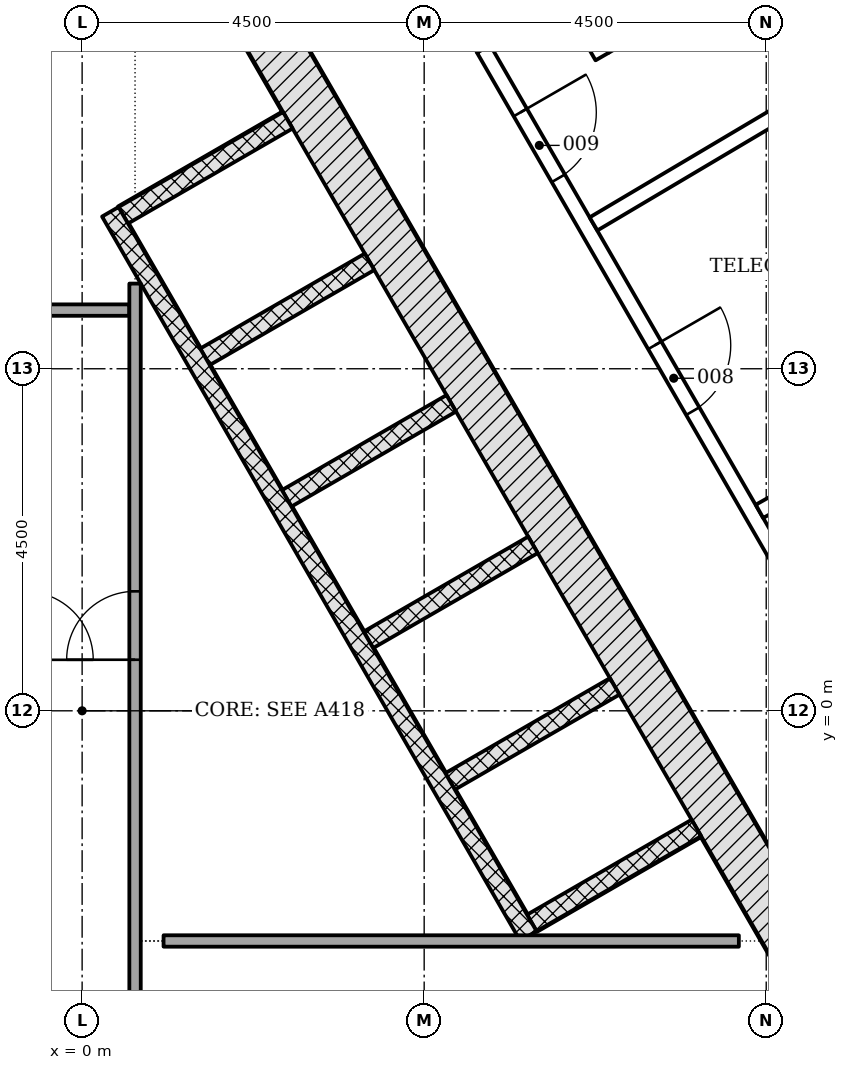
"""IFC4 building model, lengths in metres.
Left out: names, types, materials, properties, quantities, classifications, styles, units other than length and angle.
Written with IfcOpenShell. Run it as: python <this file> out.ifc"""

import sys

from ifc_helpers import new_model, si_unit, direction, frame, frame_2d, origin, place, context, subcontext, project, spatial, rectangle, extrude, element, fill, save


model = new_model("IFC4")
c1 = context("Model", 3, precision=1e-05, world=origin(), true_north=direction((0.0, 1.0)))
c2 = subcontext(c1, "Body", "Model", "MODEL_VIEW")
j1 = project(units=[si_unit("LENGTHUNIT", "METRE"), si_unit("PLANEANGLEUNIT", "RADIAN")], contexts=[c1])
p1 = place(None, origin())
s1 = spatial("IfcSite", under=j1, at=p1, CompositionType="ELEMENT")
p2 = place(p1, origin())
s2 = spatial("IfcBuilding", under=s1, at=p2, CompositionType="ELEMENT")
p3 = place(p2, frame((0.0, 0.0, 258.0)))
s3 = spatial("IfcBuildingStorey", under=s2, at=p3, CompositionType="ELEMENT", Elevation=258.0)
p4 = place(p3, frame((10.311, -4.703, -0.3), z_axis=(0.0, 0.0, 1.0), x_axis=(-0.500001446645, 0.866024568562, 0.0)))
e1 = element("IfcWall", 1, at=p4, inside=s3, PredefinedType="SHEAR", context=c2, shape_type="SweptSolid", body=[
    extrude(rectangle(XDim=18.458, YDim=0.7, at=frame_2d((9.229, 0.0))), origin(), (0.0, 0.0, 1.0), 5.5),
])
for number, where, z_axis, x_axis in (
    (2, (8.081, -1.541, -0.3), (0.0, 0.0, 1.0), (-0.866, -0.5, 0.0)),
    (3, (7.006, 0.321, -0.3), (0.0, 0.0, 1.0), (-0.866, -0.5, 0.0)),
):
    element("IfcWall", number, at=place(p3, frame(where, z_axis=z_axis, x_axis=x_axis)), inside=s3, PredefinedType="PARTITIONING", context=c2, shape_type="SweptSolid", body=[
        extrude(rectangle(XDim=2.5, YDim=0.25, at=frame_2d((1.25, 0.0))), origin(), (0.0, 0.0, 1.0), 5.5),
    ])
p5 = place(p3, frame((5.931, 2.183, -0.3), z_axis=(0.0, 0.0, 1.0), x_axis=(-0.866047370643, -0.499961950354, 0.0)))
e4 = element("IfcWall", 4, at=p5, inside=s3, PredefinedType="PARTITIONING", context=c2, shape_type="SweptSolid", body=[
    extrude(rectangle(XDim=2.5, YDim=0.25, at=frame_2d((1.25, 0.0))), origin(), (0.0, 0.0, 1.0), 5.5),
])
for number, where, z_axis, x_axis in (
    (5, (4.856, 4.045, -0.3), (0.0, 0.0, 1.0), (-0.866, -0.5, 0.0)),
    (6, (3.781, 5.907, -0.3), (0.0, 0.0, 1.0), (-0.866, -0.5, 0.0)),
    (7, (2.706, 7.769, -0.3), (0.0, 0.0, 1.0), (-0.866, -0.5, 0.0)),
):
    element("IfcWall", number, at=place(p3, frame(where, z_axis=z_axis, x_axis=x_axis)), inside=s3, PredefinedType="PARTITIONING", context=c2, shape_type="SweptSolid", body=[
        extrude(rectangle(XDim=2.5, YDim=0.25, at=frame_2d((1.25, 0.0))), origin(), (0.0, 0.0, 1.0), 5.5),
    ])
p6 = place(p3, frame((5.87, -2.961, 0.0), z_axis=(0.0, 0.0, 1.0), x_axis=(-0.50000615651, 0.866021849293, 0.0)))
e8 = element("IfcWall", 8, at=p6, inside=s3, PredefinedType="PARTITIONING", context=c2, shape_type="SweptSolid", body=[
    extrude(rectangle(XDim=11.0, YDim=0.25, at=frame_2d((5.5, 0.0))), origin(), (0.0, 0.0, 1.0), 5.2),
])
p7 = place(p3, frame((-0.679, 5.272, 0.0), z_axis=(0.0, 0.0, 1.0), x_axis=(1.0, 0.0, 0.0)))
e9 = element("IfcWall", 9, at=p7, inside=s3, PredefinedType="PARTITIONING", context=c2, shape_type="SweptSolid", body=[
    extrude(rectangle(XDim=1.3, YDim=0.15, at=frame_2d((0.65, 0.0))), origin(), (0.0, 0.0, 1.0), 5.2),
])
p8 = place(p3, frame((0.696, -5.928, 0.0), z_axis=(0.0, 0.0, 1.0), x_axis=(0.0, 1.0, 0.0)))
e10 = element("IfcWall", 10, at=p8, inside=s3, PredefinedType="PARTITIONING", context=c2, shape_type="SweptSolid", body=[
    extrude(rectangle(XDim=11.549, YDim=0.15, at=frame_2d((5.774, 0.0))), origin(), (0.0, 0.0, 1.0), 5.2),
])
p9 = place(p8, frame((6.6, 0.0, 0.0)))
e11 = element("IfcOpeningElement", 11, at=p9, cuts=e10, PredefinedType="OPENING", context=c2, shape_type="SweptSolid", body=[
    extrude(rectangle(XDim=0.9, YDim=2.1, at=frame_2d((0.45, 1.05))), frame((0.0, 0.085, 0.0), z_axis=(0.0, -1.0, 0.0), x_axis=(1.0, 0.0, 0.0)), (0.0, 0.0, 1.0), 0.17),
])
p10 = place(p3, frame((1.071, -3.028, 0.0), z_axis=(0.0, 0.0, 1.0), x_axis=(1.0, 0.0, 0.0)))
e12 = element("IfcWall", 12, at=p10, inside=s3, PredefinedType="PARTITIONING", context=c2, shape_type="SweptSolid", body=[
    extrude(rectangle(XDim=7.569, YDim=0.15, at=frame_2d((3.784, 0.0))), origin(), (0.0, 0.0, 1.0), 5.2),
])
p11 = place(p3, frame((6.408, 9.358, 0.0), z_axis=(0.0, 0.0, 1.0), x_axis=(0.499958279983, -0.866049489508, 0.0)))
e13 = element("IfcWall", 13, at=p11, inside=s3, PredefinedType="PARTITIONING", context=c2, shape_type="SweptSolid", body=[
    extrude(rectangle(XDim=0.866, YDim=0.2, at=frame_2d((0.433, 0.0))), origin(), (0.0, 0.0, 1.0), 5.2),
])
p12 = place(p3, frame((5.147, 8.745, 0.0), z_axis=(0.0, 0.0, 1.0), x_axis=(0.865987117328, 0.500066308224, 0.0)))
e14 = element("IfcWall", 14, at=p12, inside=s3, PredefinedType="PARTITIONING", context=c2, shape_type="SweptSolid", body=[
    extrude(rectangle(XDim=1.598, YDim=0.2, at=frame_2d((0.799, 0.0))), origin(), (0.0, 0.0, 1.0), 5.2),
])
p13 = place(p3, frame((5.282, 8.708, 0.0), z_axis=(0.0, 0.0, 1.0), x_axis=(0.500007704848, -0.866020955343, 0.0)))
e15 = element("IfcWall", 15, at=p13, inside=s3, PredefinedType="PARTITIONING", context=c2, shape_type="SweptSolid", body=[
    extrude(rectangle(XDim=18.991, YDim=0.2, at=frame_2d((9.496, 0.0))), origin(), (0.0, 0.0, 1.0), 4.652),
])
p14 = place(p13, frame((12.521, 0.0, 0.0)))
e16 = element("IfcOpeningElement", 16, at=p14, cuts=e15, PredefinedType="OPENING", context=c2, shape_type="SweptSolid", body=[
    extrude(rectangle(XDim=1.0, YDim=2.1, at=frame_2d((0.5, 1.05))), frame((0.0, 0.11, 0.0), z_axis=(0.0, -1.0, 0.0), x_axis=(1.0, 0.0, 0.0)), (0.0, 0.0, 1.0), 0.22),
])
p15 = place(p13, frame((4.502, 0.0, 0.0)))
e17 = element("IfcOpeningElement", 17, at=p15, cuts=e15, PredefinedType="OPENING", context=c2, shape_type="SweptSolid", body=[
    extrude(rectangle(XDim=1.0, YDim=2.1, at=frame_2d((0.5, 1.05))), frame((0.0, 0.11, 0.0), z_axis=(0.0, -1.0, 0.0), x_axis=(1.0, 0.0, 0.0)), (0.0, 0.0, 1.0), 0.22),
])
p16 = place(p13, frame((0.965, 0.0, 0.0)))
e18 = element("IfcOpeningElement", 18, at=p16, cuts=e15, PredefinedType="OPENING", context=c2, shape_type="SweptSolid", body=[
    extrude(rectangle(XDim=1.0, YDim=2.1, at=frame_2d((0.5, 1.05))), frame((0.0, 0.11, 0.0), z_axis=(0.0, -1.0, 0.0), x_axis=(1.0, 0.0, 0.0)), (0.0, 0.0, 1.0), 0.22),
])
for number, where, z_axis, x_axis in (
    (19, (8.911, 2.624, 0.0), (0.0, 0.0, 1.0), (0.872, 0.49, 0.0)),
    (20, (6.728, 6.406, 0.0), (0.0, 0.0, 1.0), (0.86, 0.51, 0.0)),
):
    element("IfcWall", number, at=place(p3, frame(where, z_axis=z_axis, x_axis=x_axis)), inside=s3, PredefinedType="PARTITIONING", context=c2, shape_type="SweptSolid", body=[
        extrude(rectangle(XDim=5.044, YDim=0.2, at=frame_2d((2.522, 0.0))), origin(), (0.0, 0.0, 1.0), 4.652),
    ])
p17 = place(p3, frame((6.878, 8.744, 0.0), z_axis=(0.0, 0.0, 1.0), x_axis=(0.866025387892, 0.500000027526, 0.0)))
e21 = element("IfcWall", 21, at=p17, inside=s3, PredefinedType="PARTITIONING", context=c2, shape_type="SweptSolid", body=[
    extrude(rectangle(XDim=3.122, YDim=0.2, at=frame_2d((1.561, 0.0))), origin(), (0.0, 0.0, 1.0), 5.2),
])
p18 = place(p9, origin())
e22 = element("IfcDoor", 22, at=p18, inside=s3, OperationType="SINGLE_SWING_LEFT", PredefinedType="DOOR", context=c2, shape_type="SweptSolid", body=[
    extrude(rectangle(XDim=0.9, YDim=2.1, at=frame_2d((0.45, 1.05))), frame((0.0, 0.025, 0.0), z_axis=(0.0, -1.0, 0.0), x_axis=(1.0, 0.0, 0.0)), (0.0, 0.0, 1.0), 0.05),
])
fill(e11, e22)
p19 = place(p15, origin())
e23 = element("IfcDoor", 23, at=p19, inside=s3, OperationType="SINGLE_SWING_LEFT", PredefinedType="DOOR", context=c2, shape_type="SweptSolid", body=[
    extrude(rectangle(XDim=1.0, YDim=2.1, at=frame_2d((0.5, 1.05))), frame((0.0, 0.025, 0.0), z_axis=(0.0, -1.0, 0.0), x_axis=(1.0, 0.0, 0.0)), (0.0, 0.0, 1.0), 0.05),
])
fill(e17, e23)
p20 = place(p16, origin())
e24 = element("IfcDoor", 24, at=p20, inside=s3, OperationType="SINGLE_SWING_LEFT", PredefinedType="DOOR", context=c2, shape_type="SweptSolid", body=[
    extrude(rectangle(XDim=1.0, YDim=2.1, at=frame_2d((0.5, 1.05))), frame((0.0, 0.025, 0.0), z_axis=(0.0, -1.0, 0.0), x_axis=(1.0, 0.0, 0.0)), (0.0, 0.0, 1.0), 0.05),
])
fill(e18, e24)
save(model, sys.argv[1])
